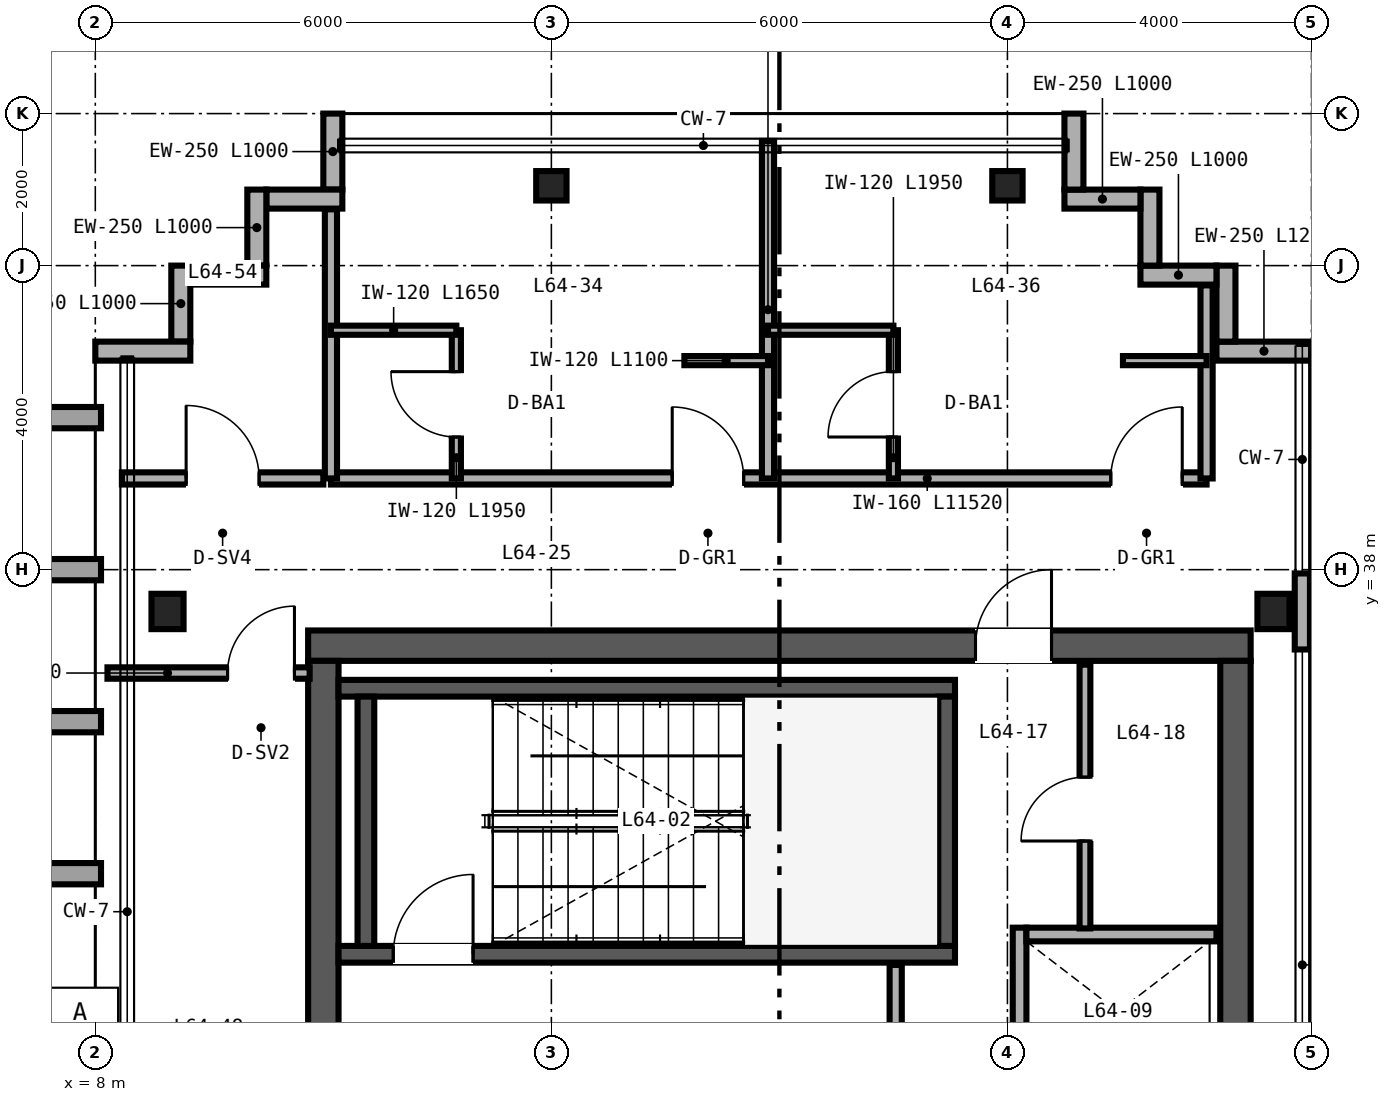
"""IFC4 building model, lengths in metres.
Left out: names, types, materials, properties, quantities, classifications, styles, units other than length and angle.
Written with IfcOpenShell. Run it as: python <this file> out.ifc"""

import sys

from ifc_helpers import new_model, si_unit, direction, frame, frame_2d, origin, origin_2d, place, context, subcontext, project, spatial, rectangle, i_section, extrude, source, transform, mapped, element, fill, save


model = new_model("IFC4")
c1 = context("Model", 3, precision=1e-05, world=origin(), true_north=direction((0.0, 1.0)))
c2 = subcontext(c1, "Body", "Model", "MODEL_VIEW")
j1 = project(units=[si_unit("LENGTHUNIT", "METRE"), si_unit("PLANEANGLEUNIT", "RADIAN")], contexts=[c1])
p1 = place(None, origin())
s1 = spatial("IfcSite", under=j1, at=p1, CompositionType="ELEMENT")
p2 = place(p1, origin())
s2 = spatial("IfcBuilding", under=s1, at=p2, CompositionType="ELEMENT")
p3 = place(p2, frame((0.0, 0.0, 254.4)))
s3 = spatial("IfcBuildingStorey", under=s2, at=p3, CompositionType="ELEMENT", Elevation=254.4)
p4 = place(p3, frame((10.8, 37.0, 0.0), z_axis=(0.0, 0.0, 1.0), x_axis=(1.0, 0.0, 0.0)))
e1 = element("IfcWall", 1, at=p4, inside=s3, PredefinedType="SHEAR", context=c2, shape_type="SweptSolid", body=[
    extrude(rectangle(XDim=12.4, YDim=0.4, at=frame_2d((6.2, 0.0))), origin(), (0.0, 0.0, 1.0), 3.38),
])
p5 = place(p4, frame((8.78, 0.0, 0.0)))
e2 = element("IfcOpeningElement", 2, at=p5, cuts=e1, PredefinedType="OPENING", context=c2, shape_type="SweptSolid", body=[
    extrude(rectangle(XDim=1.0, YDim=2.15, at=frame_2d((0.5, 1.075))), frame((0.0, 0.21, 0.0), z_axis=(0.0, -1.0, 0.0), x_axis=(1.0, 0.0, 0.0)), (0.0, 0.0, 1.0), 0.42),
])
for number, where, z_axis, x_axis in (
    (3, (11.0, 15.2, 0.0), (0.0, 0.0, 1.0), (0.0, 1.0, 0.0)),
    (4, (23.0, 15.2, 0.0), (0.0, 0.0, 1.0), (0.0, 1.0, 0.0)),
):
    element("IfcWall", number, at=place(p3, frame(where, z_axis=z_axis, x_axis=x_axis)), inside=s3, PredefinedType="SHEAR", context=c2, shape_type="SweptSolid", body=[
        extrude(rectangle(XDim=21.6, YDim=0.4, at=frame_2d((10.8, 0.0))), origin(), (0.0, 0.0, 1.0), 3.38),
    ])
p6 = place(p3, frame((11.2, 32.94, 0.0), z_axis=(0.0, 0.0, 1.0), x_axis=(1.0, 0.0, 0.0)))
e5 = element("IfcWall", 5, at=p6, inside=s3, PredefinedType="SHEAR", context=c2, shape_type="SweptSolid", body=[
    extrude(rectangle(XDim=8.11, YDim=0.22, at=frame_2d((4.055, 0.0))), origin(), (0.0, 0.0, 1.0), 3.4),
])
p7 = place(p6, frame((0.72, 0.0, 0.0)))
e6 = element("IfcOpeningElement", 6, at=p7, cuts=e5, PredefinedType="OPENING", context=c2, shape_type="SweptSolid", body=[
    extrude(rectangle(XDim=1.05, YDim=2.15, at=frame_2d((0.525, 1.075))), frame((0.0, 0.12, 0.0), z_axis=(0.0, -1.0, 0.0), x_axis=(1.0, 0.0, 0.0)), (0.0, 0.0, 1.0), 0.24),
])
p8 = place(p3, frame((11.2, 36.44, 0.0), z_axis=(0.0, 0.0, 1.0), x_axis=(1.0, 0.0, 0.0)))
e7 = element("IfcWall", 7, at=p8, inside=s3, PredefinedType="SHEAR", context=c2, shape_type="SweptSolid", body=[
    extrude(rectangle(XDim=8.11, YDim=0.22, at=frame_2d((4.055, 0.0))), origin(), (0.0, 0.0, 1.0), 3.4),
])
for number, where, z_axis, x_axis in (
    (8, (11.56, 33.05, 0.0), (0.0, 0.0, 1.0), (0.0, 1.0, 0.0)),
    (9, (19.2, 33.05, 0.0), (0.0, 0.0, 1.0), (0.0, 1.0, 0.0)),
):
    element("IfcWall", number, at=place(p3, frame(where, z_axis=z_axis, x_axis=x_axis)), inside=s3, PredefinedType="SHEAR", context=c2, shape_type="SweptSolid", body=[
        extrude(rectangle(XDim=3.28, YDim=0.22, at=frame_2d((1.64, 0.0))), origin(), (0.0, 0.0, 1.0), 3.4),
    ])
m1 = source(origin(), c2, "Body", "SweptSolid", [
    extrude(i_section(OverallWidth=0.422, OverallDepth=0.465, WebThickness=0.045, FlangeThickness=0.073, FilletRadius=0.025, at=origin_2d()), origin(), (0.0, 0.0, 1.0), 3.38),
])
for number, where, z_axis, x_axis in (
    (10, (8.95, 37.45, 0.0), (0.0, 0.0, 1.0), (1.0, 0.0, 0.0)),
    (11, (23.5, 37.45, 0.0), (0.0, 0.0, 1.0), (1.0, 0.0, 0.0)),
):
    element("IfcColumn", number, at=place(p3, frame(where, z_axis=z_axis, x_axis=x_axis)), inside=s3, PredefinedType="COLUMN", context=c2, shape_type="MappedRepresentation", body=[
        mapped(m1, transform((0.0, 0.0, 0.0), scale=1.0)),
    ])
m2 = source(origin(), c2, "Body", "SweptSolid", [
    extrude(i_section(OverallWidth=0.399, OverallDepth=0.387, WebThickness=0.021, FlangeThickness=0.033, FilletRadius=0.025, at=origin_2d()), origin(), (0.0, 0.0, 1.0), 3.38),
])
for number, where, z_axis, x_axis in (
    (12, (14.0, 43.05, 0.0), (0.0, 0.0, 1.0), (1.0, 0.0, 0.0)),
    (13, (20.0, 43.05, 0.0), (0.0, 0.0, 1.0), (1.0, 0.0, 0.0)),
):
    element("IfcColumn", number, at=place(p3, frame(where, z_axis=z_axis, x_axis=x_axis)), inside=s3, PredefinedType="COLUMN", context=c2, shape_type="MappedRepresentation", body=[
        mapped(m2, transform((0.0, 0.0, 0.0), scale=1.0)),
    ])
p9 = place(p3, frame((24.0, 40.875, 0.0), z_axis=(0.0, 0.0, 1.0), x_axis=(-1.0, 0.0, 0.0)))
e14 = element("IfcWall", 14, at=p9, inside=s3, PredefinedType="SOLIDWALL", context=c2, shape_type="SweptSolid", body=[
    extrude(rectangle(XDim=1.25, YDim=0.25, at=frame_2d((0.625, 0.0))), origin(), (0.0, 0.0, 1.0), 3.38),
])
for number, where, z_axis, x_axis in (
    (15, (22.875, 41.0, 0.0), (0.0, 0.0, 1.0), (0.0, 1.0, 0.0)),
    (16, (22.75, 41.875, 0.0), (0.0, 0.0, 1.0), (-1.0, 0.0, 0.0)),
    (17, (21.875, 42.0, 0.0), (0.0, 0.0, 1.0), (0.0, 1.0, 0.0)),
    (18, (21.75, 42.875, 0.0), (0.0, 0.0, 1.0), (-1.0, 0.0, 0.0)),
    (19, (20.875, 43.0, 0.0), (0.0, 0.0, 1.0), (0.0, 1.0, 0.0)),
    (20, (11.125, 44.0, 0.0), (0.0, 0.0, 1.0), (0.0, -1.0, 0.0)),
    (21, (11.25, 42.875, 0.0), (0.0, 0.0, 1.0), (-1.0, 0.0, 0.0)),
    (22, (10.125, 43.0, 0.0), (0.0, 0.0, 1.0), (0.0, -1.0, 0.0)),
    (23, (10.25, 41.875, 0.0), (0.0, 0.0, 1.0), (-1.0, 0.0, 0.0)),
    (24, (9.125, 42.0, 0.0), (0.0, 0.0, 1.0), (0.0, -1.0, 0.0)),
):
    element("IfcWall", number, at=place(p3, frame(where, z_axis=z_axis, x_axis=x_axis)), inside=s3, PredefinedType="SOLIDWALL", context=c2, shape_type="SweptSolid", body=[
        extrude(rectangle(XDim=1.0, YDim=0.25, at=frame_2d((0.5, 0.0))), origin(), (0.0, 0.0, 1.0), 3.38),
    ])
p10 = place(p3, frame((9.25, 40.875, 0.0), z_axis=(0.0, 0.0, 1.0), x_axis=(-1.0, 0.0, 0.0)))
e25 = element("IfcWall", 25, at=p10, inside=s3, PredefinedType="SOLIDWALL", context=c2, shape_type="SweptSolid", body=[
    extrude(rectangle(XDim=1.25, YDim=0.25, at=frame_2d((0.625, 0.0))), origin(), (0.0, 0.0, 1.0), 3.38),
])
p11 = place(p3, frame((23.88, 36.95, 0.0), z_axis=(0.0, 0.0, 1.0), x_axis=(0.0, 1.0, 0.0)))
e26 = element("IfcWall", 26, at=p11, inside=s3, PredefinedType="PARAPET", context=c2, shape_type="SweptSolid", body=[
    extrude(rectangle(XDim=1.0, YDim=0.2, at=frame_2d((0.5, 0.0))), origin(), (0.0, 0.0, 1.0), 3.38),
])
p12 = place(p3, frame((20.16, 29.0, 0.0), z_axis=(0.0, 0.0, 1.0), x_axis=(0.0, 1.0, 0.0)))
e27 = element("IfcWall", 27, at=p12, inside=s3, PredefinedType="SOLIDWALL", context=c2, shape_type="SweptSolid", body=[
    extrude(rectangle(XDim=4.29, YDim=0.18, at=frame_2d((2.145, 0.0))), origin(), (0.0, 0.0, 1.0), 3.38),
])
p13 = place(p3, frame((20.25, 33.2, 0.0), z_axis=(0.0, 0.0, 1.0), x_axis=(1.0, 0.0, 0.0)))
e28 = element("IfcWall", 28, at=p13, inside=s3, PredefinedType="SOLIDWALL", context=c2, shape_type="SweptSolid", body=[
    extrude(rectangle(XDim=2.5, YDim=0.18, at=frame_2d((1.25, 0.0))), origin(), (0.0, 0.0, 1.0), 3.38),
])
p14 = place(p3, frame((18.53, 28.9, 0.0), z_axis=(0.0, 0.0, 1.0), x_axis=(0.0, 1.0, 0.0)))
e29 = element("IfcWall", 29, at=p14, inside=s3, PredefinedType="PARTITIONING", context=c2, shape_type="SweptSolid", body=[
    extrude(rectangle(XDim=3.9, YDim=0.16, at=frame_2d((1.95, 0.0))), origin(), (0.0, 0.0, 1.0), 3.38),
])
p15 = place(p14, frame((1.5, 0.0, 0.0)))
e30 = element("IfcOpeningElement", 30, at=p15, cuts=e29, PredefinedType="OPENING", context=c2, shape_type="SweptSolid", body=[
    extrude(rectangle(XDim=1.0, YDim=2.15, at=frame_2d((0.5, 1.075))), frame((0.0, 0.09, 0.0), z_axis=(0.0, -1.0, 0.0), x_axis=(1.0, 0.0, 0.0)), (0.0, 0.0, 1.0), 0.18),
])
p16 = place(p3, frame((21.02, 33.28, 0.0), z_axis=(0.0, 0.0, 1.0), x_axis=(0.0, 1.0, 0.0)))
e31 = element("IfcWall", 31, at=p16, inside=s3, PredefinedType="PARTITIONING", context=c2, shape_type="SweptSolid", body=[
    extrude(rectangle(XDim=3.47, YDim=0.142, at=frame_2d((1.735, 0.0))), origin(), (0.0, 0.0, 1.0), 3.38),
])
p17 = place(p16, frame((1.15, 0.0, 0.0)))
e32 = element("IfcOpeningElement", 32, at=p17, cuts=e31, PredefinedType="OPENING", context=c2, shape_type="SweptSolid", body=[
    extrude(rectangle(XDim=0.84, YDim=2.1, at=frame_2d((0.42, 1.05))), frame((0.0, 0.081, 0.0), z_axis=(0.0, -1.0, 0.0), x_axis=(1.0, 0.0, 0.0)), (0.0, 0.0, 1.0), 0.162),
])
p18 = place(p3, frame((11.1, 39.2, 0.0), z_axis=(0.0, 0.0, 1.0), x_axis=(1.0, 0.0, 0.0)))
e33 = element("IfcWall", 33, at=p18, inside=s3, PredefinedType="PARTITIONING", context=c2, shape_type="SweptSolid", body=[
    extrude(rectangle(XDim=11.52, YDim=0.16, at=frame_2d((5.76, 0.0))), origin(), (0.0, 0.0, 1.0), 3.38),
])
p19 = place(p18, frame((4.49, 0.0, 0.0)))
e34 = element("IfcOpeningElement", 34, at=p19, cuts=e33, PredefinedType="OPENING", context=c2, shape_type="SweptSolid", body=[
    extrude(rectangle(XDim=0.94, YDim=2.15, at=frame_2d((0.47, 1.075))), frame((0.0, 0.09, 0.0), z_axis=(0.0, -1.0, 0.0), x_axis=(1.0, 0.0, 0.0)), (0.0, 0.0, 1.0), 0.18),
])
p20 = place(p18, frame((10.26, 0.0, 0.0)))
e35 = element("IfcOpeningElement", 35, at=p20, cuts=e33, PredefinedType="OPENING", context=c2, shape_type="SweptSolid", body=[
    extrude(rectangle(XDim=0.94, YDim=2.15, at=frame_2d((0.47, 1.075))), frame((0.0, 0.09, 0.0), z_axis=(0.0, -1.0, 0.0), x_axis=(1.0, 0.0, 0.0)), (0.0, 0.0, 1.0), 0.18),
])
p21 = place(p3, frame((11.1, 39.2, 0.0), z_axis=(0.0, 0.0, 1.0), x_axis=(0.0, 1.0, 0.0)))
e36 = element("IfcWall", 36, at=p21, inside=s3, PredefinedType="PARTITIONING", context=c2, shape_type="SweptSolid", body=[
    extrude(rectangle(XDim=3.54, YDim=0.16, at=frame_2d((1.77, 0.0))), origin(), (0.0, 0.0, 1.0), 3.38),
])
p22 = place(p3, frame((22.62, 39.2, 0.0), z_axis=(0.0, 0.0, 1.0), x_axis=(0.0, 1.0, 0.0)))
e37 = element("IfcWall", 37, at=p22, inside=s3, PredefinedType="PARTITIONING", context=c2, shape_type="SweptSolid", body=[
    extrude(rectangle(XDim=2.54, YDim=0.16, at=frame_2d((1.27, 0.0))), origin(), (0.0, 0.0, 1.0), 3.38),
])
p23 = place(p3, frame((16.85, 39.2, 0.0), z_axis=(0.0, 0.0, 1.0), x_axis=(0.0, 1.0, 0.0)))
e38 = element("IfcWall", 38, at=p23, inside=s3, PredefinedType="PARTITIONING", context=c2, shape_type="SweptSolid", body=[
    extrude(rectangle(XDim=4.44, YDim=0.16, at=frame_2d((2.22, 0.0))), origin(), (0.0, 0.0, 1.0), 2.687),
])
p24 = place(p3, frame((12.75, 39.2, 0.0), z_axis=(0.0, 0.0, 1.0), x_axis=(0.0, 1.0, 0.0)))
e39 = element("IfcWall", 39, at=p24, inside=s3, PredefinedType="PARTITIONING", context=c2, shape_type="SweptSolid", body=[
    extrude(rectangle(XDim=1.95, YDim=0.12, at=frame_2d((0.975, 0.0))), origin(), (0.0, 0.0, 1.0), 3.38),
])
p25 = place(p24, frame((0.545, 0.0, 0.0)))
e40 = element("IfcOpeningElement", 40, at=p25, cuts=e39, PredefinedType="OPENING", context=c2, shape_type="SweptSolid", body=[
    extrude(rectangle(XDim=0.86, YDim=2.1, at=frame_2d((0.43, 1.05))), frame((0.0, 0.07, 0.0), z_axis=(0.0, -1.0, 0.0), x_axis=(1.0, 0.0, 0.0)), (0.0, 0.0, 1.0), 0.14),
])
p26 = place(p3, frame((11.1, 41.15, 0.0), z_axis=(0.0, 0.0, 1.0), x_axis=(1.0, 0.0, 0.0)))
e41 = element("IfcWall", 41, at=p26, inside=s3, PredefinedType="PARTITIONING", context=c2, shape_type="SweptSolid", body=[
    extrude(rectangle(XDim=1.65, YDim=0.12, at=frame_2d((0.825, 0.0))), origin(), (0.0, 0.0, 1.0), 3.38),
])
p27 = place(p3, frame((15.75, 40.75, 0.0), z_axis=(0.0, 0.0, 1.0), x_axis=(1.0, 0.0, 0.0)))
e42 = element("IfcWall", 42, at=p27, inside=s3, PredefinedType="PARTITIONING", context=c2, shape_type="SweptSolid", body=[
    extrude(rectangle(XDim=1.1, YDim=0.12, at=frame_2d((0.55, 0.0))), origin(), (0.0, 0.0, 1.0), 3.38),
])
p28 = place(p3, frame((18.5, 39.2, 0.0), z_axis=(0.0, 0.0, 1.0), x_axis=(0.0, 1.0, 0.0)))
e43 = element("IfcWall", 43, at=p28, inside=s3, PredefinedType="PARTITIONING", context=c2, shape_type="SweptSolid", body=[
    extrude(rectangle(XDim=1.95, YDim=0.12, at=frame_2d((0.975, 0.0))), origin(), (0.0, 0.0, 1.0), 3.38),
])
p29 = place(p28, frame((0.545, 0.0, 0.0)))
e44 = element("IfcOpeningElement", 44, at=p29, cuts=e43, PredefinedType="OPENING", context=c2, shape_type="SweptSolid", body=[
    extrude(rectangle(XDim=0.86, YDim=2.1, at=frame_2d((0.43, 1.05))), frame((0.0, 0.07, 0.0), z_axis=(0.0, -1.0, 0.0), x_axis=(1.0, 0.0, 0.0)), (0.0, 0.0, 1.0), 0.14),
])
p30 = place(p3, frame((16.85, 41.15, 0.0), z_axis=(0.0, 0.0, 1.0), x_axis=(1.0, 0.0, 0.0)))
e45 = element("IfcWall", 45, at=p30, inside=s3, PredefinedType="PARTITIONING", context=c2, shape_type="SweptSolid", body=[
    extrude(rectangle(XDim=1.65, YDim=0.12, at=frame_2d((0.825, 0.0))), origin(), (0.0, 0.0, 1.0), 3.38),
])
p31 = place(p3, frame((21.52, 40.75, 0.0), z_axis=(0.0, 0.0, 1.0), x_axis=(1.0, 0.0, 0.0)))
e46 = element("IfcWall", 46, at=p31, inside=s3, PredefinedType="PARTITIONING", context=c2, shape_type="SweptSolid", body=[
    extrude(rectangle(XDim=1.1, YDim=0.12, at=frame_2d((0.55, 0.0))), origin(), (0.0, 0.0, 1.0), 3.38),
])
p32 = place(p3, frame((8.16, 36.64, 0.0), z_axis=(0.0, 0.0, 1.0), x_axis=(1.0, 0.0, 0.0)))
e47 = element("IfcWall", 47, at=p32, inside=s3, PredefinedType="PARTITIONING", context=c2, shape_type="SweptSolid", body=[
    extrude(rectangle(XDim=2.66, YDim=0.15, at=frame_2d((1.33, 0.0))), origin(), (0.0, 0.0, 1.0), 2.763),
])
p33 = place(p32, frame((1.58, 0.0, 0.0)))
e48 = element("IfcOpeningElement", 48, at=p33, cuts=e47, PredefinedType="OPENING", context=c2, shape_type="SweptSolid", body=[
    extrude(rectangle(XDim=0.88, YDim=2.15, at=frame_2d((0.44, 1.075))), frame((0.0, 0.085, 0.0), z_axis=(0.0, -1.0, 0.0), x_axis=(1.0, 0.0, 0.0)), (0.0, 0.0, 1.0), 0.17),
])
p34 = place(p3, frame((8.35, 39.2, 0.0), z_axis=(0.0, 0.0, 1.0), x_axis=(1.0, 0.0, 0.0)))
e49 = element("IfcWall", 49, at=p34, inside=s3, PredefinedType="PARTITIONING", context=c2, shape_type="SweptSolid", body=[
    extrude(rectangle(XDim=2.65, YDim=0.16, at=frame_2d((1.325, 0.0))), origin(), (0.0, 0.0, 1.0), 3.38),
])
p35 = place(p34, frame((0.845, 0.0, 0.0)))
e50 = element("IfcOpeningElement", 50, at=p35, cuts=e49, PredefinedType="OPENING", context=c2, shape_type="SweptSolid", body=[
    extrude(rectangle(XDim=0.96, YDim=2.15, at=frame_2d((0.48, 1.075))), frame((0.0, 0.09, 0.0), z_axis=(0.0, -1.0, 0.0), x_axis=(1.0, 0.0, 0.0)), (0.0, 0.0, 1.0), 0.18),
])
m3 = source(origin(), c2, "Body", "SweptSolid", [
    extrude(rectangle(XDim=1.05, YDim=2.15, at=frame_2d((0.525, 1.075))), frame((0.0, 0.025, 0.0), z_axis=(0.0, -1.0, 0.0), x_axis=(1.0, 0.0, 0.0)), (0.0, 0.0, 1.0), 0.05),
])
p36 = place(p7, origin())
e51 = element("IfcDoor", 51, at=p36, inside=s3, OperationType="SINGLE_SWING_RIGHT", PredefinedType="DOOR", context=c2, shape_type="MappedRepresentation", body=[
    mapped(m3, transform((0.0, 0.0, 0.0), scale=1.0)),
])
fill(e6, e51)
m4 = source(origin(), c2, "Body", "SweptSolid", [
    extrude(rectangle(XDim=0.84, YDim=2.1, at=frame_2d((0.42, 1.05))), frame((0.0, 0.025, 0.0), z_axis=(0.0, -1.0, 0.0), x_axis=(1.0, 0.0, 0.0)), (0.0, 0.0, 1.0), 0.05),
])
p37 = place(p17, origin())
e52 = element("IfcDoor", 52, at=p37, inside=s3, OperationType="SINGLE_SWING_LEFT", PredefinedType="DOOR", context=c2, shape_type="MappedRepresentation", body=[
    mapped(m4, transform((0.0, 0.0, 0.0), scale=1.0)),
])
fill(e32, e52)
m5 = source(origin(), c2, "Body", "SweptSolid", [
    extrude(rectangle(XDim=1.0, YDim=2.15, at=frame_2d((0.5, 1.075))), frame((0.0, 0.025, 0.0), z_axis=(0.0, -1.0, 0.0), x_axis=(1.0, 0.0, 0.0)), (0.0, 0.0, 1.0), 0.05),
])
p38 = place(p5, origin())
e53 = element("IfcDoor", 53, at=p38, inside=s3, OperationType="SINGLE_SWING_RIGHT", PredefinedType="DOOR", context=c2, shape_type="MappedRepresentation", body=[
    mapped(m5, transform((0.0, 0.0, 0.0), scale=1.0)),
])
fill(e2, e53)
m6 = source(origin(), c2, "Body", "SweptSolid", [
    extrude(rectangle(XDim=0.86, YDim=2.1, at=frame_2d((0.43, 1.05))), frame((0.0, 0.025, 0.0), z_axis=(0.0, -1.0, 0.0), x_axis=(1.0, 0.0, 0.0)), (0.0, 0.0, 1.0), 0.05),
])
p39 = place(p25, origin())
e54 = element("IfcDoor", 54, at=p39, inside=s3, OperationType="SINGLE_SWING_RIGHT", PredefinedType="DOOR", context=c2, shape_type="MappedRepresentation", body=[
    mapped(m6, transform((0.0, 0.0, 0.0), scale=1.0)),
])
fill(e40, e54)
p40 = place(p29, origin())
e55 = element("IfcDoor", 55, at=p40, inside=s3, OperationType="SINGLE_SWING_LEFT", PredefinedType="DOOR", context=c2, shape_type="MappedRepresentation", body=[
    mapped(m6, transform((0.0, 0.0, 0.0), scale=1.0)),
])
fill(e44, e55)
m7 = source(origin(), c2, "Body", "SweptSolid", [
    extrude(rectangle(XDim=0.94, YDim=2.15, at=frame_2d((0.47, 1.075))), frame((0.0, 0.025, 0.0), z_axis=(0.0, -1.0, 0.0), x_axis=(1.0, 0.0, 0.0)), (0.0, 0.0, 1.0), 0.05),
])
p41 = place(p19, origin())
e56 = element("IfcDoor", 56, at=p41, inside=s3, OperationType="SINGLE_SWING_LEFT", PredefinedType="DOOR", context=c2, shape_type="MappedRepresentation", body=[
    mapped(m7, transform((0.0, 0.0, 0.0), scale=1.0)),
])
fill(e34, e56)
p42 = place(p20, origin())
e57 = element("IfcDoor", 57, at=p42, inside=s3, OperationType="SINGLE_SWING_RIGHT", PredefinedType="DOOR", context=c2, shape_type="MappedRepresentation", body=[
    mapped(m7, transform((0.0, 0.0, 0.0), scale=1.0)),
])
fill(e35, e57)
m8 = source(origin(), c2, "Body", "SweptSolid", [
    extrude(rectangle(XDim=0.88, YDim=2.15, at=frame_2d((0.44, 1.075))), frame((0.0, 0.025, 0.0), z_axis=(0.0, -1.0, 0.0), x_axis=(1.0, 0.0, 0.0)), (0.0, 0.0, 1.0), 0.05),
])
p43 = place(p33, origin())
e58 = element("IfcDoor", 58, at=p43, inside=s3, OperationType="SINGLE_SWING_RIGHT", PredefinedType="DOOR", context=c2, shape_type="MappedRepresentation", body=[
    mapped(m8, transform((0.0, 0.0, 0.0), scale=1.0)),
])
fill(e48, e58)
m9 = source(origin(), c2, "Body", "SweptSolid", [
    extrude(rectangle(XDim=0.96, YDim=2.15, at=frame_2d((0.48, 1.075))), frame((0.0, 0.025, 0.0), z_axis=(0.0, -1.0, 0.0), x_axis=(1.0, 0.0, 0.0)), (0.0, 0.0, 1.0), 0.05),
])
p44 = place(p35, origin())
e59 = element("IfcDoor", 59, at=p44, inside=s3, OperationType="SINGLE_SWING_LEFT", PredefinedType="DOOR", context=c2, shape_type="MappedRepresentation", body=[
    mapped(m9, transform((0.0, 0.0, 0.0), scale=1.0)),
])
fill(e50, e59)
save(model, sys.argv[1])
